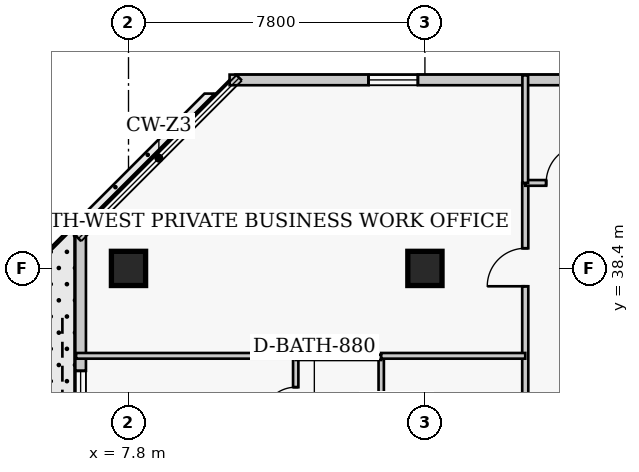
"""IFC4 building model, lengths in metres.
Left out: names, types, materials, properties, quantities, classifications, styles, units other than length and angle.
Written with IfcOpenShell. Run it as: python <this file> out.ifc"""

import sys

from ifc_helpers import new_model, si_unit, direction, frame, frame_2d, origin, origin_2d, place, context, subcontext, project, spatial, rectangle, extrude, element, fill, save


model = new_model("IFC4")
c1 = context("Model", 3, precision=1e-05, world=origin(), true_north=direction((0.0, 1.0)))
c2 = subcontext(c1, "Body", "Model", "MODEL_VIEW")
j1 = project(units=[si_unit("LENGTHUNIT", "METRE"), si_unit("PLANEANGLEUNIT", "RADIAN")], contexts=[c1])
p1 = place(None, origin())
s1 = spatial("IfcSite", under=j1, at=p1, CompositionType="ELEMENT")
p2 = place(p1, origin())
s2 = spatial("IfcBuilding", under=s1, at=p2, CompositionType="ELEMENT")
p3 = place(p2, frame((0.0, 0.0, 189.0)))
s3 = spatial("IfcBuildingStorey", under=s2, at=p3, CompositionType="ELEMENT", Elevation=189.0)
for number, where, z_axis, x_axis in (
    (1, (7.8, 38.4, 0.0), (0.0, 0.0, 1.0), (1.0, 0.0, 0.0)),
    (2, (15.6, 38.4, 0.0), (0.0, 0.0, 1.0), (1.0, 0.0, 0.0)),
):
    element("IfcColumn", number, at=place(p3, frame(where, z_axis=z_axis, x_axis=x_axis)), inside=s3, PredefinedType="COLUMN", context=c2, shape_type="SweptSolid", body=[
        extrude(rectangle(XDim=0.9, YDim=0.9, at=origin_2d()), origin(), (0.0, 0.0, 1.0), 3.9),
    ])
p4 = place(p3, frame((36.29, 43.36, 0.0), z_axis=(0.0, 0.0, 1.0), x_axis=(-1.0, 0.0, 0.0)))
e3 = element("IfcWall", 3, at=p4, inside=s3, PredefinedType="SOLIDWALL", context=c2, shape_type="SweptSolid", body=[
    extrude(rectangle(XDim=25.83, YDim=0.28, at=frame_2d((12.915, 0.0))), origin(), (0.0, 0.0, 1.0), 3.65),
])
p5 = place(p4, frame((3.005, 0.0, 0.85)))
e4 = element("IfcOpeningElement", 4, at=p5, cuts=e3, PredefinedType="OPENING", context=c2, shape_type="SweptSolid", body=[
    extrude(rectangle(XDim=1.3, YDim=1.7, at=frame_2d((0.65, 0.85))), frame((0.0, 0.15, 0.0), z_axis=(0.0, -1.0, 0.0), x_axis=(1.0, 0.0, 0.0)), (0.0, 0.0, 1.0), 0.3),
])
p6 = place(p4, frame((12.265, 0.0, 0.85)))
e5 = element("IfcOpeningElement", 5, at=p6, cuts=e3, PredefinedType="OPENING", context=c2, shape_type="SweptSolid", body=[
    extrude(rectangle(XDim=1.3, YDim=1.7, at=frame_2d((0.65, 0.85))), frame((0.0, 0.15, 0.0), z_axis=(0.0, -1.0, 0.0), x_axis=(1.0, 0.0, 0.0)), (0.0, 0.0, 1.0), 0.3),
])
p7 = place(p4, frame((20.875, 0.0, 0.85)))
e6 = element("IfcOpeningElement", 6, at=p7, cuts=e3, PredefinedType="OPENING", context=c2, shape_type="SweptSolid", body=[
    extrude(rectangle(XDim=1.3, YDim=1.7, at=frame_2d((0.65, 0.85))), frame((0.0, 0.15, 0.0), z_axis=(0.0, -1.0, 0.0), x_axis=(1.0, 0.0, 0.0)), (0.0, 0.0, 1.0), 0.3),
])
p8 = place(p3, frame((6.54, 39.44, 0.0), z_axis=(0.0, 0.0, 1.0), x_axis=(0.0, -1.0, 0.0)))
e7 = element("IfcWall", 7, at=p8, inside=s3, PredefinedType="SOLIDWALL", context=c2, shape_type="SweptSolid", body=[
    extrude(rectangle(XDim=29.88, YDim=0.28, at=frame_2d((14.94, 0.0))), origin(), (0.0, 0.0, 1.0), 3.65),
])
p9 = place(p8, frame((3.735, 0.0, 0.85)))
e8 = element("IfcOpeningElement", 8, at=p9, cuts=e7, PredefinedType="OPENING", context=c2, shape_type="SweptSolid", body=[
    extrude(rectangle(XDim=1.3, YDim=1.7, at=frame_2d((0.65, 0.85))), frame((0.0, 0.15, 0.0), z_axis=(0.0, -1.0, 0.0), x_axis=(1.0, 0.0, 0.0)), (0.0, 0.0, 1.0), 0.3),
])
p10 = place(p8, frame((11.205, 0.0, 0.85)))
e9 = element("IfcOpeningElement", 9, at=p10, cuts=e7, PredefinedType="OPENING", context=c2, shape_type="SweptSolid", body=[
    extrude(rectangle(XDim=1.3, YDim=1.7, at=frame_2d((0.65, 0.85))), frame((0.0, 0.15, 0.0), z_axis=(0.0, -1.0, 0.0), x_axis=(1.0, 0.0, 0.0)), (0.0, 0.0, 1.0), 0.3),
])
p11 = place(p8, frame((17.375, 0.0, 0.85)))
e10 = element("IfcOpeningElement", 10, at=p11, cuts=e7, PredefinedType="OPENING", context=c2, shape_type="SweptSolid", body=[
    extrude(rectangle(XDim=1.3, YDim=1.7, at=frame_2d((0.65, 0.85))), frame((0.0, 0.15, 0.0), z_axis=(0.0, -1.0, 0.0), x_axis=(1.0, 0.0, 0.0)), (0.0, 0.0, 1.0), 0.3),
])
p12 = place(p8, frame((25.495, 0.0, 0.85)))
e11 = element("IfcOpeningElement", 11, at=p12, cuts=e7, PredefinedType="OPENING", context=c2, shape_type="SweptSolid", body=[
    extrude(rectangle(XDim=1.3, YDim=1.7, at=frame_2d((0.65, 0.85))), frame((0.0, 0.15, 0.0), z_axis=(0.0, -1.0, 0.0), x_axis=(1.0, 0.0, 0.0)), (0.0, 0.0, 1.0), 0.3),
])
p13 = place(p3, frame((18.24, 7.55, 0.0), z_axis=(0.0, 0.0, 1.0), x_axis=(0.0, 1.0, 0.0)))
e12 = element("IfcWall", 12, at=p13, inside=s3, PredefinedType="PARTITIONING", context=c2, shape_type="SweptSolid", body=[
    extrude(rectangle(XDim=33.1, YDim=0.16, at=frame_2d((16.55, 0.0))), origin(), (0.0, 0.0, 1.0), 3.65),
])
p14 = place(p13, frame((1.35, 0.0, 0.0)))
e13 = element("IfcOpeningElement", 13, at=p14, cuts=e12, PredefinedType="OPENING", context=c2, shape_type="SweptSolid", body=[
    extrude(rectangle(XDim=0.95, YDim=2.1, at=frame_2d((0.475, 1.05))), frame((0.0, 0.09, 0.0), z_axis=(0.0, -1.0, 0.0), x_axis=(1.0, 0.0, 0.0)), (0.0, 0.0, 1.0), 0.18),
])
p15 = place(p13, frame((7.575, 0.0, 0.0)))
e14 = element("IfcOpeningElement", 14, at=p15, cuts=e12, PredefinedType="OPENING", context=c2, shape_type="SweptSolid", body=[
    extrude(rectangle(XDim=0.95, YDim=2.1, at=frame_2d((0.475, 1.05))), frame((0.0, 0.09, 0.0), z_axis=(0.0, -1.0, 0.0), x_axis=(1.0, 0.0, 0.0)), (0.0, 0.0, 1.0), 0.18),
])
p16 = place(p13, frame((20.025, 0.0, 0.0)))
e15 = element("IfcOpeningElement", 15, at=p16, cuts=e12, PredefinedType="OPENING", context=c2, shape_type="SweptSolid", body=[
    extrude(rectangle(XDim=0.95, YDim=2.1, at=frame_2d((0.475, 1.05))), frame((0.0, 0.09, 0.0), z_axis=(0.0, -1.0, 0.0), x_axis=(1.0, 0.0, 0.0)), (0.0, 0.0, 1.0), 0.18),
])
p17 = place(p13, frame((30.38, 0.0, 0.0)))
e16 = element("IfcOpeningElement", 16, at=p17, cuts=e12, PredefinedType="OPENING", context=c2, shape_type="SweptSolid", body=[
    extrude(rectangle(XDim=1.0, YDim=2.15, at=frame_2d((0.5, 1.075))), frame((0.0, 0.09, 0.0), z_axis=(0.0, -1.0, 0.0), x_axis=(1.0, 0.0, 0.0)), (0.0, 0.0, 1.0), 0.18),
])
p18 = place(p3, frame((18.24, 40.65, 0.0), z_axis=(0.0, 0.0, 1.0), x_axis=(1.0, 0.0, 0.0)))
e17 = element("IfcWall", 17, at=p18, inside=s3, PredefinedType="PARTITIONING", context=c2, shape_type="SweptSolid", body=[
    extrude(rectangle(XDim=3.86, YDim=0.15, at=frame_2d((1.93, 0.0))), origin(), (0.0, 0.0, 1.0), 3.65),
])
p19 = place(p18, frame((0.55, 0.0, 0.0)))
e18 = element("IfcOpeningElement", 18, at=p19, cuts=e17, PredefinedType="OPENING", context=c2, shape_type="SweptSolid", body=[
    extrude(rectangle(XDim=1.0, YDim=2.15, at=frame_2d((0.5, 1.075))), frame((0.0, 0.085, 0.0), z_axis=(0.0, -1.0, 0.0), x_axis=(1.0, 0.0, 0.0)), (0.0, 0.0, 1.0), 0.17),
])
p20 = place(p3, frame((18.24, 40.65, 0.0), z_axis=(0.0, 0.0, 1.0), x_axis=(0.0, 1.0, 0.0)))
e19 = element("IfcWall", 19, at=p20, inside=s3, PredefinedType="PARTITIONING", context=c2, shape_type="SweptSolid", body=[
    extrude(rectangle(XDim=2.83, YDim=0.15, at=frame_2d((1.415, 0.0))), origin(), (0.0, 0.0, 1.0), 3.65),
])
p21 = place(p3, frame((12.2, 33.61, 0.0), z_axis=(0.0, 0.0, 1.0), x_axis=(0.0, 1.0, 0.0)))
e20 = element("IfcWall", 20, at=p21, inside=s3, PredefinedType="PLUMBINGWALL", context=c2, shape_type="SweptSolid", body=[
    extrude(rectangle(XDim=2.45, YDim=0.14, at=frame_2d((1.225, 0.0))), origin(), (0.0, 0.0, 1.0), 3.65),
])
p22 = place(p21, frame((0.785, 0.0, 0.0)))
e21 = element("IfcOpeningElement", 21, at=p22, cuts=e20, PredefinedType="OPENING", context=c2, shape_type="SweptSolid", body=[
    extrude(rectangle(XDim=0.88, YDim=2.05, at=frame_2d((0.44, 1.025))), frame((0.0, 0.08, 0.0), z_axis=(0.0, -1.0, 0.0), x_axis=(1.0, 0.0, 0.0)), (0.0, 0.0, 1.0), 0.16),
])
p23 = place(p3, frame((14.45, 33.61, 0.0), z_axis=(0.0, 0.0, 1.0), x_axis=(0.0, 1.0, 0.0)))
e22 = element("IfcWall", 22, at=p23, inside=s3, PredefinedType="PLUMBINGWALL", context=c2, shape_type="SweptSolid", body=[
    extrude(rectangle(XDim=2.45, YDim=0.14, at=frame_2d((1.225, 0.0))), origin(), (0.0, 0.0, 1.0), 3.65),
])
p24 = place(p3, frame((12.2, 36.06, 0.0), z_axis=(0.0, 0.0, 1.0), x_axis=(1.0, 0.0, 0.0)))
e23 = element("IfcWall", 23, at=p24, inside=s3, PredefinedType="PLUMBINGWALL", context=c2, shape_type="SweptSolid", body=[
    extrude(rectangle(XDim=2.25, YDim=0.14, at=frame_2d((1.125, 0.0))), origin(), (0.0, 0.0, 1.0), 3.65),
])
p25 = place(p3, frame((6.42, 36.1, 0.0), z_axis=(0.0, 0.0, 1.0), x_axis=(1.0, 0.0, 0.0)))
e24 = element("IfcWall", 24, at=p25, inside=s3, PredefinedType="PARTITIONING", context=c2, shape_type="SweptSolid", body=[
    extrude(rectangle(XDim=5.78, YDim=0.15, at=frame_2d((2.89, 0.0))), origin(), (0.0, 0.0, 1.0), 3.65),
])
p26 = place(p3, frame((14.45, 36.1, 0.0), z_axis=(0.0, 0.0, 1.0), x_axis=(1.0, 0.0, 0.0)))
e25 = element("IfcWall", 25, at=p26, inside=s3, PredefinedType="PARTITIONING", context=c2, shape_type="SweptSolid", body=[
    extrude(rectangle(XDim=3.79, YDim=0.15, at=frame_2d((1.895, 0.0))), origin(), (0.0, 0.0, 1.0), 3.65),
])
p27 = place(p7, origin())
e26 = element("IfcWindow", 26, at=p27, inside=s3, PartitioningType="SINGLE_PANEL", PredefinedType="WINDOW", context=c2, shape_type="SweptSolid", body=[
    extrude(rectangle(XDim=1.3, YDim=1.7, at=frame_2d((0.65, 0.85))), frame((0.0, 0.03, 0.0), z_axis=(0.0, -1.0, 0.0), x_axis=(1.0, 0.0, 0.0)), (0.0, 0.0, 1.0), 0.06),
])
fill(e6, e26)
p28 = place(p9, origin())
e27 = element("IfcWindow", 27, at=p28, inside=s3, PartitioningType="SINGLE_PANEL", PredefinedType="WINDOW", context=c2, shape_type="SweptSolid", body=[
    extrude(rectangle(XDim=1.3, YDim=1.7, at=frame_2d((0.65, 0.85))), frame((0.0, 0.03, 0.0), z_axis=(0.0, -1.0, 0.0), x_axis=(1.0, 0.0, 0.0)), (0.0, 0.0, 1.0), 0.06),
])
fill(e8, e27)
p29 = place(p19, origin())
e28 = element("IfcDoor", 28, at=p29, inside=s3, OperationType="SINGLE_SWING_RIGHT", PredefinedType="DOOR", context=c2, shape_type="SweptSolid", body=[
    extrude(rectangle(XDim=1.0, YDim=2.15, at=frame_2d((0.5, 1.075))), frame((0.0, 0.025, 0.0), z_axis=(0.0, -1.0, 0.0), x_axis=(1.0, 0.0, 0.0)), (0.0, 0.0, 1.0), 0.05),
])
fill(e18, e28)
p30 = place(p22, origin())
e29 = element("IfcDoor", 29, at=p30, inside=s3, OperationType="SINGLE_SWING_LEFT", PredefinedType="DOOR", context=c2, shape_type="SweptSolid", body=[
    extrude(rectangle(XDim=0.88, YDim=2.05, at=frame_2d((0.44, 1.025))), frame((0.0, 0.025, 0.0), z_axis=(0.0, -1.0, 0.0), x_axis=(1.0, 0.0, 0.0)), (0.0, 0.0, 1.0), 0.05),
])
fill(e21, e29)
p31 = place(p17, origin())
e30 = element("IfcDoor", 30, at=p31, inside=s3, OperationType="SINGLE_SWING_LEFT", PredefinedType="DOOR", context=c2, shape_type="SweptSolid", body=[
    extrude(rectangle(XDim=1.0, YDim=2.15, at=frame_2d((0.5, 1.075))), frame((0.0, 0.025, 0.0), z_axis=(0.0, -1.0, 0.0), x_axis=(1.0, 0.0, 0.0)), (0.0, 0.0, 1.0), 0.05),
])
fill(e16, e30)
save(model, sys.argv[1])
